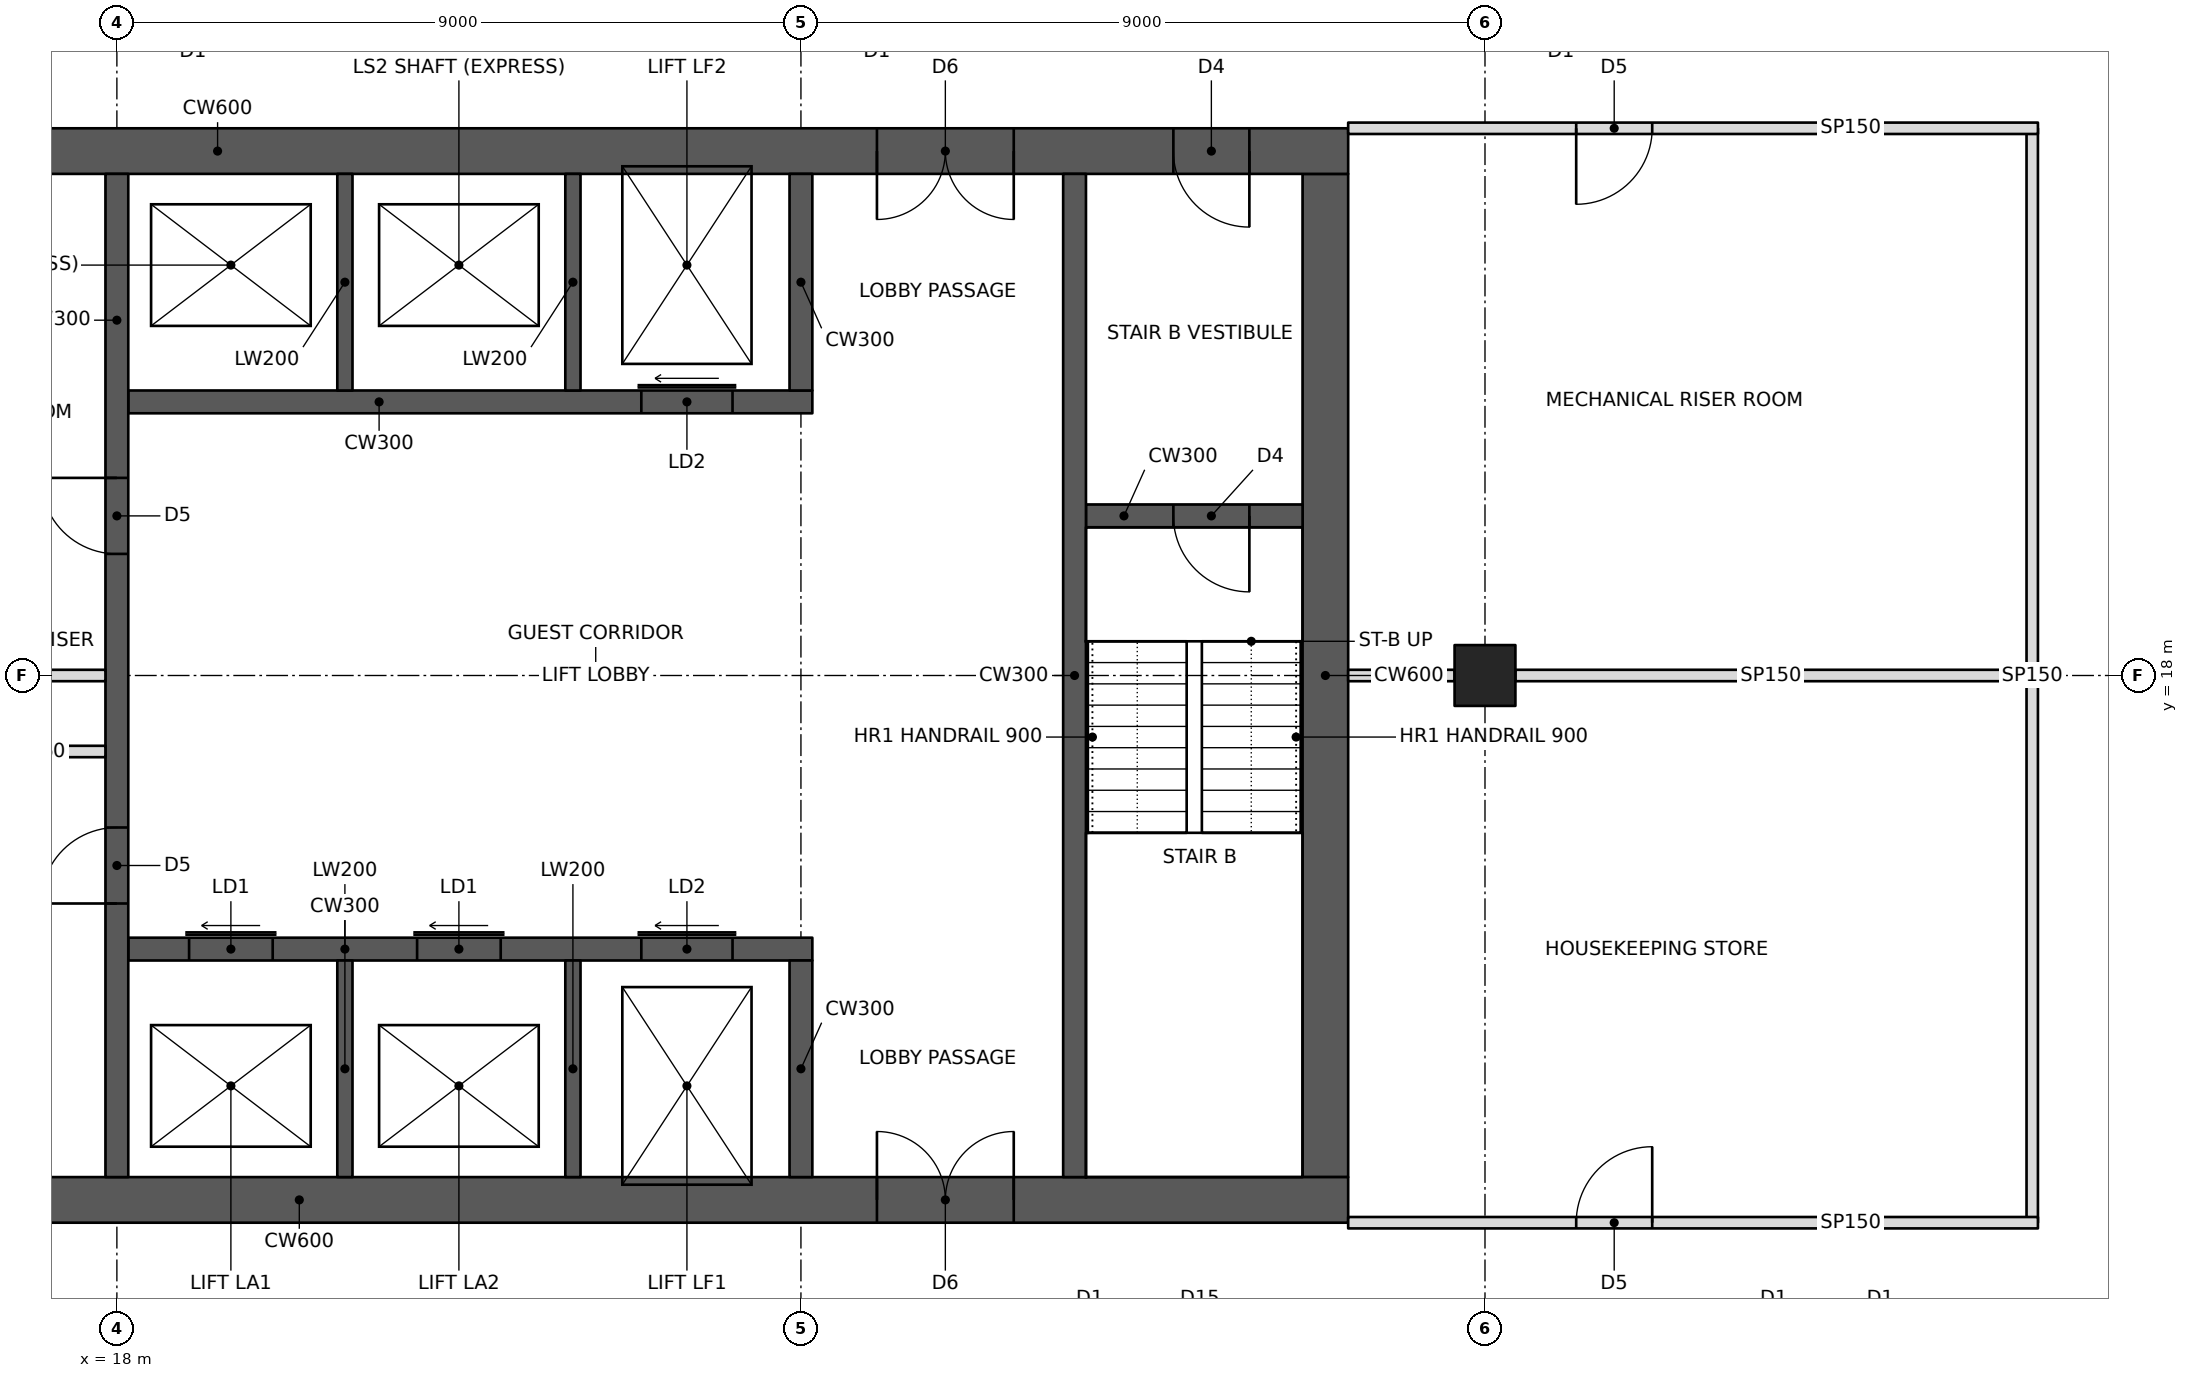
"""IFC4 building model, lengths in metres.
Left out: names, types, materials, properties, quantities, classifications, styles, units other than length and angle.
Written with IfcOpenShell. Run it as: python <this file> out.ifc"""

import sys

from ifc_helpers import new_model, si_unit, direction, frame, frame_2d, origin, origin_2d, place, context, subcontext, project, spatial, rectangle, hollow_rectangle, extrude, element, fill, save


model = new_model("IFC4")
c1 = context("Model", 3, precision=1e-05, world=origin(), true_north=direction((0.0, 1.0)))
c2 = subcontext(c1, "Body", "Model", "MODEL_VIEW")
j1 = project(units=[si_unit("LENGTHUNIT", "METRE"), si_unit("PLANEANGLEUNIT", "RADIAN")], contexts=[c1])
p1 = place(None, origin())
s1 = spatial("IfcSite", under=j1, at=p1, CompositionType="ELEMENT")
p2 = place(p1, origin())
s2 = spatial("IfcBuilding", under=s1, at=p2, CompositionType="ELEMENT")
p3 = place(p2, frame((0.0, 0.0, 28.0)))
s3 = spatial("IfcBuildingStorey", under=s2, at=p3, CompositionType="ELEMENT", Elevation=28.0)
p4 = place(p3, frame((36.0, 18.0, 0.0), z_axis=(0.0, 0.0, 1.0), x_axis=(0.0, 1.0, 0.0)))
e1 = element("IfcColumn", 1, at=p4, inside=s3, PredefinedType="COLUMN", context=c2, shape_type="SweptSolid", body=[
    extrude(hollow_rectangle(XDim=0.8, YDim=0.8, WallThickness=0.1, at=origin_2d()), origin(), (0.0, 0.0, 1.0), 3.4),
])
p5 = place(p3, frame((10.8, 11.1, 0.0), z_axis=(0.0, 0.0, 1.0), x_axis=(1.0, 0.0, 0.0)))
e2 = element("IfcWall", 2, at=p5, inside=s3, PredefinedType="SHEAR", context=c2, shape_type="SweptSolid", body=[
    extrude(rectangle(XDim=23.4, YDim=0.6, at=frame_2d((11.7, 0.0))), origin(), (0.0, 0.0, 1.0), 3.4),
])
p6 = place(p5, frame((1.0, 0.0, 0.0)))
e3 = element("IfcOpeningElement", 3, at=p6, cuts=e2, PredefinedType="OPENING", context=c2, shape_type="SweptSolid", body=[
    extrude(rectangle(XDim=1.0, YDim=2.1, at=frame_2d((0.5, 1.05))), frame((0.0, 0.31, 0.0), z_axis=(0.0, -1.0, 0.0), x_axis=(1.0, 0.0, 0.0)), (0.0, 0.0, 1.0), 0.62),
])
p7 = place(p5, frame((17.2, 0.0, 0.0)))
e4 = element("IfcOpeningElement", 4, at=p7, cuts=e2, PredefinedType="OPENING", context=c2, shape_type="SweptSolid", body=[
    extrude(rectangle(XDim=1.8, YDim=2.1, at=frame_2d((0.9, 1.05))), frame((0.0, 0.31, 0.0), z_axis=(0.0, -1.0, 0.0), x_axis=(1.0, 0.0, 0.0)), (0.0, 0.0, 1.0), 0.62),
])
p8 = place(p3, frame((10.8, 24.9, 0.0), z_axis=(0.0, 0.0, 1.0), x_axis=(1.0, 0.0, 0.0)))
e5 = element("IfcWall", 5, at=p8, inside=s3, PredefinedType="SHEAR", context=c2, shape_type="SweptSolid", body=[
    extrude(rectangle(XDim=23.4, YDim=0.6, at=frame_2d((11.7, 0.0))), origin(), (0.0, 0.0, 1.0), 3.4),
])
p9 = place(p8, frame((17.2, 0.0, 0.0)))
e6 = element("IfcOpeningElement", 6, at=p9, cuts=e5, PredefinedType="OPENING", context=c2, shape_type="SweptSolid", body=[
    extrude(rectangle(XDim=1.8, YDim=2.1, at=frame_2d((0.9, 1.05))), frame((0.0, 0.31, 0.0), z_axis=(0.0, -1.0, 0.0), x_axis=(1.0, 0.0, 0.0)), (0.0, 0.0, 1.0), 0.62),
])
p10 = place(p8, frame((21.1, 0.0, 0.0)))
e7 = element("IfcOpeningElement", 7, at=p10, cuts=e5, PredefinedType="OPENING", context=c2, shape_type="SweptSolid", body=[
    extrude(rectangle(XDim=1.0, YDim=2.1, at=frame_2d((0.5, 1.05))), frame((0.0, 0.31, 0.0), z_axis=(0.0, -1.0, 0.0), x_axis=(1.0, 0.0, 0.0)), (0.0, 0.0, 1.0), 0.62),
])
p11 = place(p3, frame((33.9, 11.4, 0.0), z_axis=(0.0, 0.0, 1.0), x_axis=(0.0, 1.0, 0.0)))
e8 = element("IfcWall", 8, at=p11, inside=s3, PredefinedType="SHEAR", context=c2, shape_type="SweptSolid", body=[
    extrude(rectangle(XDim=13.2, YDim=0.6, at=frame_2d((6.6, 0.0))), origin(), (0.0, 0.0, 1.0), 3.4),
])
p12 = place(p3, frame((18.0, 11.4, 0.0), z_axis=(0.0, 0.0, 1.0), x_axis=(0.0, 1.0, 0.0)))
e9 = element("IfcWall", 9, at=p12, inside=s3, PredefinedType="SHEAR", context=c2, shape_type="SweptSolid", body=[
    extrude(rectangle(XDim=13.2, YDim=0.3, at=frame_2d((6.6, 0.0))), origin(), (0.0, 0.0, 1.0), 3.4),
])
p13 = place(p12, frame((3.6, 0.0, 0.0)))
e10 = element("IfcOpeningElement", 10, at=p13, cuts=e9, PredefinedType="OPENING", context=c2, shape_type="SweptSolid", body=[
    extrude(rectangle(XDim=1.0, YDim=2.1, at=frame_2d((0.5, 1.05))), frame((0.0, 0.16, 0.0), z_axis=(0.0, -1.0, 0.0), x_axis=(1.0, 0.0, 0.0)), (0.0, 0.0, 1.0), 0.32),
])
p14 = place(p12, frame((8.2, 0.0, 0.0)))
e11 = element("IfcOpeningElement", 11, at=p14, cuts=e9, PredefinedType="OPENING", context=c2, shape_type="SweptSolid", body=[
    extrude(rectangle(XDim=1.0, YDim=2.1, at=frame_2d((0.5, 1.05))), frame((0.0, 0.16, 0.0), z_axis=(0.0, -1.0, 0.0), x_axis=(1.0, 0.0, 0.0)), (0.0, 0.0, 1.0), 0.32),
])
p15 = place(p3, frame((14.55, 18.0, 0.0), z_axis=(0.0, 0.0, 1.0), x_axis=(1.0, 0.0, 0.0)))
e12 = element("IfcWall", 12, at=p15, inside=s3, PredefinedType="PARTITIONING", context=c2, shape_type="SweptSolid", body=[
    extrude(rectangle(XDim=3.3, YDim=0.15, at=frame_2d((1.65, 0.0))), origin(), (0.0, 0.0, 1.0), 3.2),
])
p16 = place(p3, frame((18.15, 14.4, 0.0), z_axis=(0.0, 0.0, 1.0), x_axis=(1.0, 0.0, 0.0)))
e13 = element("IfcWall", 13, at=p16, inside=s3, PredefinedType="SHEAR", context=c2, shape_type="SweptSolid", body=[
    extrude(rectangle(XDim=9.0, YDim=0.3, at=frame_2d((4.5, 0.0))), origin(), (0.0, 0.0, 1.0), 3.4),
])
p17 = place(p16, frame((0.8, 0.0, 0.0)))
e14 = element("IfcOpeningElement", 14, at=p17, cuts=e13, PredefinedType="OPENING", context=c2, shape_type="SweptSolid", body=[
    extrude(rectangle(XDim=1.1, YDim=2.1, at=frame_2d((0.55, 1.05))), frame((0.0, 0.16, 0.0), z_axis=(0.0, -1.0, 0.0), x_axis=(1.0, 0.0, 0.0)), (0.0, 0.0, 1.0), 0.32),
])
p18 = place(p16, frame((3.8, 0.0, 0.0)))
e15 = element("IfcOpeningElement", 15, at=p18, cuts=e13, PredefinedType="OPENING", context=c2, shape_type="SweptSolid", body=[
    extrude(rectangle(XDim=1.1, YDim=2.1, at=frame_2d((0.55, 1.05))), frame((0.0, 0.16, 0.0), z_axis=(0.0, -1.0, 0.0), x_axis=(1.0, 0.0, 0.0)), (0.0, 0.0, 1.0), 0.32),
])
p19 = place(p16, frame((6.75, 0.0, 0.0)))
e16 = element("IfcOpeningElement", 16, at=p19, cuts=e13, PredefinedType="OPENING", context=c2, shape_type="SweptSolid", body=[
    extrude(rectangle(XDim=1.2, YDim=2.1, at=frame_2d((0.6, 1.05))), frame((0.0, 0.16, 0.0), z_axis=(0.0, -1.0, 0.0), x_axis=(1.0, 0.0, 0.0)), (0.0, 0.0, 1.0), 0.32),
])
p20 = place(p3, frame((27.0, 11.4, 0.0), z_axis=(0.0, 0.0, 1.0), x_axis=(0.0, 1.0, 0.0)))
e17 = element("IfcWall", 17, at=p20, inside=s3, PredefinedType="SHEAR", context=c2, shape_type="SweptSolid", body=[
    extrude(rectangle(XDim=2.85, YDim=0.3, at=frame_2d((1.425, 0.0))), origin(), (0.0, 0.0, 1.0), 3.4),
])
for number, where, z_axis, x_axis in (
    (18, (21.0, 11.4, 0.0), (0.0, 0.0, 1.0), (0.0, 1.0, 0.0)),
    (19, (24.0, 11.4, 0.0), (0.0, 0.0, 1.0), (0.0, 1.0, 0.0)),
):
    element("IfcWall", number, at=place(p3, frame(where, z_axis=z_axis, x_axis=x_axis)), inside=s3, PredefinedType="SHEAR", context=c2, shape_type="SweptSolid", body=[
        extrude(rectangle(XDim=2.85, YDim=0.2, at=frame_2d((1.425, 0.0))), origin(), (0.0, 0.0, 1.0), 3.4),
    ])
p21 = place(p3, frame((18.15, 21.6, 0.0), z_axis=(0.0, 0.0, 1.0), x_axis=(1.0, 0.0, 0.0)))
e20 = element("IfcWall", 20, at=p21, inside=s3, PredefinedType="SHEAR", context=c2, shape_type="SweptSolid", body=[
    extrude(rectangle(XDim=9.0, YDim=0.3, at=frame_2d((4.5, 0.0))), origin(), (0.0, 0.0, 1.0), 3.4),
])
p22 = place(p21, frame((6.75, 0.0, 0.0)))
e21 = element("IfcOpeningElement", 21, at=p22, cuts=e20, PredefinedType="OPENING", context=c2, shape_type="SweptSolid", body=[
    extrude(rectangle(XDim=1.2, YDim=2.1, at=frame_2d((0.6, 1.05))), frame((0.0, 0.16, 0.0), z_axis=(0.0, -1.0, 0.0), x_axis=(1.0, 0.0, 0.0)), (0.0, 0.0, 1.0), 0.32),
])
p23 = place(p3, frame((27.0, 21.75, 0.0), z_axis=(0.0, 0.0, 1.0), x_axis=(0.0, 1.0, 0.0)))
e22 = element("IfcWall", 22, at=p23, inside=s3, PredefinedType="SHEAR", context=c2, shape_type="SweptSolid", body=[
    extrude(rectangle(XDim=2.85, YDim=0.3, at=frame_2d((1.425, 0.0))), origin(), (0.0, 0.0, 1.0), 3.4),
])
for number, where, z_axis, x_axis in (
    (23, (21.0, 21.75, 0.0), (0.0, 0.0, 1.0), (0.0, 1.0, 0.0)),
    (24, (24.0, 21.75, 0.0), (0.0, 0.0, 1.0), (0.0, 1.0, 0.0)),
):
    element("IfcWall", number, at=place(p3, frame(where, z_axis=z_axis, x_axis=x_axis)), inside=s3, PredefinedType="SHEAR", context=c2, shape_type="SweptSolid", body=[
        extrude(rectangle(XDim=2.85, YDim=0.2, at=frame_2d((1.425, 0.0))), origin(), (0.0, 0.0, 1.0), 3.4),
    ])
p24 = place(p3, frame((30.6, 11.4, 0.0), z_axis=(0.0, 0.0, 1.0), x_axis=(0.0, 1.0, 0.0)))
e25 = element("IfcWall", 25, at=p24, inside=s3, PredefinedType="SHEAR", context=c2, shape_type="SweptSolid", body=[
    extrude(rectangle(XDim=13.2, YDim=0.3, at=frame_2d((6.6, 0.0))), origin(), (0.0, 0.0, 1.0), 3.4),
])
p25 = place(p3, frame((30.75, 20.1, 0.0), z_axis=(0.0, 0.0, 1.0), x_axis=(1.0, 0.0, 0.0)))
e26 = element("IfcWall", 26, at=p25, inside=s3, PredefinedType="SHEAR", context=c2, shape_type="SweptSolid", body=[
    extrude(rectangle(XDim=2.85, YDim=0.3, at=frame_2d((1.425, 0.0))), origin(), (0.0, 0.0, 1.0), 3.4),
])
p26 = place(p25, frame((1.15, 0.0, 0.0)))
e27 = element("IfcOpeningElement", 27, at=p26, cuts=e26, PredefinedType="OPENING", context=c2, shape_type="SweptSolid", body=[
    extrude(rectangle(XDim=1.0, YDim=2.1, at=frame_2d((0.5, 1.05))), frame((0.0, 0.16, 0.0), z_axis=(0.0, -1.0, 0.0), x_axis=(1.0, 0.0, 0.0)), (0.0, 0.0, 1.0), 0.32),
])
p27 = place(p3, frame((34.2, 10.8, 0.0), z_axis=(0.0, 0.0, 1.0), x_axis=(1.0, 0.0, 0.0)))
e28 = element("IfcWall", 28, at=p27, inside=s3, PredefinedType="PARTITIONING", context=c2, shape_type="SweptSolid", body=[
    extrude(rectangle(XDim=9.075, YDim=0.15, at=frame_2d((4.538, 0.0))), origin(), (0.0, 0.0, 1.0), 2.404),
])
p28 = place(p27, frame((3.0, 0.0, 0.0)))
e29 = element("IfcOpeningElement", 29, at=p28, cuts=e28, PredefinedType="OPENING", context=c2, shape_type="SweptSolid", body=[
    extrude(rectangle(XDim=1.0, YDim=2.1, at=frame_2d((0.5, 1.05))), frame((0.0, 0.085, 0.0), z_axis=(0.0, -1.0, 0.0), x_axis=(1.0, 0.0, 0.0)), (0.0, 0.0, 1.0), 0.17),
])
p29 = place(p3, frame((34.2, 25.2, 0.0), z_axis=(0.0, 0.0, 1.0), x_axis=(1.0, 0.0, 0.0)))
e30 = element("IfcWall", 30, at=p29, inside=s3, PredefinedType="PARTITIONING", context=c2, shape_type="SweptSolid", body=[
    extrude(rectangle(XDim=9.075, YDim=0.15, at=frame_2d((4.538, 0.0))), origin(), (0.0, 0.0, 1.0), 2.404),
])
p30 = place(p29, frame((3.0, 0.0, 0.0)))
e31 = element("IfcOpeningElement", 31, at=p30, cuts=e30, PredefinedType="OPENING", context=c2, shape_type="SweptSolid", body=[
    extrude(rectangle(XDim=1.0, YDim=2.1, at=frame_2d((0.5, 1.05))), frame((0.0, 0.085, 0.0), z_axis=(0.0, -1.0, 0.0), x_axis=(1.0, 0.0, 0.0)), (0.0, 0.0, 1.0), 0.17),
])
p31 = place(p3, frame((43.2, 10.8, 0.0), z_axis=(0.0, 0.0, 1.0), x_axis=(0.0, 1.0, 0.0)))
e32 = element("IfcWall", 32, at=p31, inside=s3, PredefinedType="PARTITIONING", context=c2, shape_type="SweptSolid", body=[
    extrude(rectangle(XDim=14.4, YDim=0.15, at=frame_2d((7.2, 0.0))), origin(), (0.0, 0.0, 1.0), 2.404),
])
p32 = place(p3, frame((34.2, 18.0, 0.0), z_axis=(0.0, 0.0, 1.0), x_axis=(1.0, 0.0, 0.0)))
e33 = element("IfcWall", 33, at=p32, inside=s3, PredefinedType="PARTITIONING", context=c2, shape_type="SweptSolid", body=[
    extrude(rectangle(XDim=1.4, YDim=0.15, at=frame_2d((0.7, 0.0))), origin(), (0.0, 0.0, 1.0), 3.2),
])
p33 = place(p3, frame((36.4, 18.0, 0.0), z_axis=(0.0, 0.0, 1.0), x_axis=(1.0, 0.0, 0.0)))
e34 = element("IfcWall", 34, at=p33, inside=s3, PredefinedType="PARTITIONING", context=c2, shape_type="SweptSolid", body=[
    extrude(rectangle(XDim=6.725, YDim=0.15, at=frame_2d((3.363, 0.0))), origin(), (0.0, 0.0, 1.0), 2.405),
])
p34 = place(p3, frame((14.55, 17.0, 0.0), z_axis=(0.0, 0.0, 1.0), x_axis=(1.0, 0.0, 0.0)))
e35 = element("IfcWall", 35, at=p34, inside=s3, PredefinedType="PARTITIONING", context=c2, shape_type="SweptSolid", body=[
    extrude(rectangle(XDim=3.3, YDim=0.15, at=frame_2d((1.65, 0.0))), origin(), (0.0, 0.0, 1.0), 3.2),
])
p35 = place(p34, frame((0.3, 0.0, 0.0)))
e36 = element("IfcOpeningElement", 36, at=p35, cuts=e35, PredefinedType="OPENING", context=c2, shape_type="SweptSolid", body=[
    extrude(rectangle(XDim=1.0, YDim=2.1, at=frame_2d((0.5, 1.05))), frame((0.0, 0.085, 0.0), z_axis=(0.0, -1.0, 0.0), x_axis=(1.0, 0.0, 0.0)), (0.0, 0.0, 1.0), 0.17),
])
p36 = place(p28, origin())
e37 = element("IfcDoor", 37, at=p36, inside=s3, OperationType="SINGLE_SWING_RIGHT", PredefinedType="DOOR", context=c2, shape_type="SweptSolid", body=[
    extrude(rectangle(XDim=1.0, YDim=2.1, at=frame_2d((0.5, 1.05))), frame((0.0, 0.025, 0.0), z_axis=(0.0, -1.0, 0.0), x_axis=(1.0, 0.0, 0.0)), (0.0, 0.0, 1.0), 0.05),
])
fill(e29, e37)
p37 = place(p30, frame((1.0, 0.0, 0.0), z_axis=(0.0, 0.0, 1.0), x_axis=(-1.0, 0.0, 0.0)))
e38 = element("IfcDoor", 38, at=p37, inside=s3, OperationType="SINGLE_SWING_RIGHT", PredefinedType="DOOR", context=c2, shape_type="SweptSolid", body=[
    extrude(rectangle(XDim=1.0, YDim=2.1, at=frame_2d((0.5, 1.05))), frame((0.0, 0.025, 0.0), z_axis=(0.0, -1.0, 0.0), x_axis=(1.0, 0.0, 0.0)), (0.0, 0.0, 1.0), 0.05),
])
fill(e31, e38)
p38 = place(p7, origin())
e39 = element("IfcDoor", 39, at=p38, inside=s3, OperationType="DOUBLE_DOOR_SINGLE_SWING", PredefinedType="DOOR", context=c2, shape_type="SweptSolid", body=[
    extrude(rectangle(XDim=1.8, YDim=2.1, at=frame_2d((0.9, 1.05))), frame((0.0, 0.025, 0.0), z_axis=(0.0, -1.0, 0.0), x_axis=(1.0, 0.0, 0.0)), (0.0, 0.0, 1.0), 0.05),
])
fill(e4, e39)
p39 = place(p9, frame((1.8, 0.0, 0.0), z_axis=(0.0, 0.0, 1.0), x_axis=(-1.0, 0.0, 0.0)))
e40 = element("IfcDoor", 40, at=p39, inside=s3, OperationType="DOUBLE_DOOR_SINGLE_SWING", PredefinedType="DOOR", context=c2, shape_type="SweptSolid", body=[
    extrude(rectangle(XDim=1.8, YDim=2.1, at=frame_2d((0.9, 1.05))), frame((0.0, 0.025, 0.0), z_axis=(0.0, -1.0, 0.0), x_axis=(1.0, 0.0, 0.0)), (0.0, 0.0, 1.0), 0.05),
])
fill(e6, e40)
p40 = place(p10, frame((1.0, 0.0, 0.0), z_axis=(0.0, 0.0, 1.0), x_axis=(-1.0, 0.0, 0.0)))
e41 = element("IfcDoor", 41, at=p40, inside=s3, OperationType="SINGLE_SWING_LEFT", PredefinedType="DOOR", context=c2, shape_type="SweptSolid", body=[
    extrude(rectangle(XDim=1.0, YDim=2.1, at=frame_2d((0.5, 1.05))), frame((0.0, 0.025, 0.0), z_axis=(0.0, -1.0, 0.0), x_axis=(1.0, 0.0, 0.0)), (0.0, 0.0, 1.0), 0.05),
])
fill(e7, e41)
p41 = place(p26, frame((1.0, 0.0, 0.0), z_axis=(0.0, 0.0, 1.0), x_axis=(-1.0, 0.0, 0.0)))
e42 = element("IfcDoor", 42, at=p41, inside=s3, OperationType="SINGLE_SWING_LEFT", PredefinedType="DOOR", context=c2, shape_type="SweptSolid", body=[
    extrude(rectangle(XDim=1.0, YDim=2.1, at=frame_2d((0.5, 1.05))), frame((0.0, 0.025, 0.0), z_axis=(0.0, -1.0, 0.0), x_axis=(1.0, 0.0, 0.0)), (0.0, 0.0, 1.0), 0.05),
])
fill(e27, e42)
p42 = place(p13, origin())
e43 = element("IfcDoor", 43, at=p42, inside=s3, OperationType="SINGLE_SWING_LEFT", PredefinedType="DOOR", context=c2, shape_type="SweptSolid", body=[
    extrude(rectangle(XDim=1.0, YDim=2.1, at=frame_2d((0.5, 1.05))), frame((0.0, 0.025, 0.0), z_axis=(0.0, -1.0, 0.0), x_axis=(1.0, 0.0, 0.0)), (0.0, 0.0, 1.0), 0.05),
])
fill(e10, e43)
p43 = place(p14, origin())
e44 = element("IfcDoor", 44, at=p43, inside=s3, OperationType="SINGLE_SWING_RIGHT", PredefinedType="DOOR", context=c2, shape_type="SweptSolid", body=[
    extrude(rectangle(XDim=1.0, YDim=2.1, at=frame_2d((0.5, 1.05))), frame((0.0, 0.025, 0.0), z_axis=(0.0, -1.0, 0.0), x_axis=(1.0, 0.0, 0.0)), (0.0, 0.0, 1.0), 0.05),
])
fill(e11, e44)
p44 = place(p17, origin())
e45 = element("IfcDoor", 45, at=p44, inside=s3, OperationType="SLIDING_TO_LEFT", PredefinedType="DOOR", context=c2, shape_type="SweptSolid", body=[
    extrude(rectangle(XDim=1.1, YDim=2.1, at=frame_2d((0.55, 1.05))), frame((0.0, 0.025, 0.0), z_axis=(0.0, -1.0, 0.0), x_axis=(1.0, 0.0, 0.0)), (0.0, 0.0, 1.0), 0.05),
])
fill(e14, e45)
p45 = place(p18, origin())
e46 = element("IfcDoor", 46, at=p45, inside=s3, OperationType="SLIDING_TO_LEFT", PredefinedType="DOOR", context=c2, shape_type="SweptSolid", body=[
    extrude(rectangle(XDim=1.1, YDim=2.1, at=frame_2d((0.55, 1.05))), frame((0.0, 0.025, 0.0), z_axis=(0.0, -1.0, 0.0), x_axis=(1.0, 0.0, 0.0)), (0.0, 0.0, 1.0), 0.05),
])
fill(e15, e46)
p46 = place(p19, origin())
e47 = element("IfcDoor", 47, at=p46, inside=s3, OperationType="SLIDING_TO_LEFT", PredefinedType="DOOR", context=c2, shape_type="SweptSolid", body=[
    extrude(rectangle(XDim=1.2, YDim=2.1, at=frame_2d((0.6, 1.05))), frame((0.0, 0.025, 0.0), z_axis=(0.0, -1.0, 0.0), x_axis=(1.0, 0.0, 0.0)), (0.0, 0.0, 1.0), 0.05),
])
fill(e16, e47)
p47 = place(p22, origin())
e48 = element("IfcDoor", 48, at=p47, inside=s3, OperationType="SLIDING_TO_LEFT", PredefinedType="DOOR", context=c2, shape_type="SweptSolid", body=[
    extrude(rectangle(XDim=1.2, YDim=2.1, at=frame_2d((0.6, 1.05))), frame((0.0, 0.025, 0.0), z_axis=(0.0, -1.0, 0.0), x_axis=(1.0, 0.0, 0.0)), (0.0, 0.0, 1.0), 0.05),
])
fill(e21, e48)
save(model, sys.argv[1])
